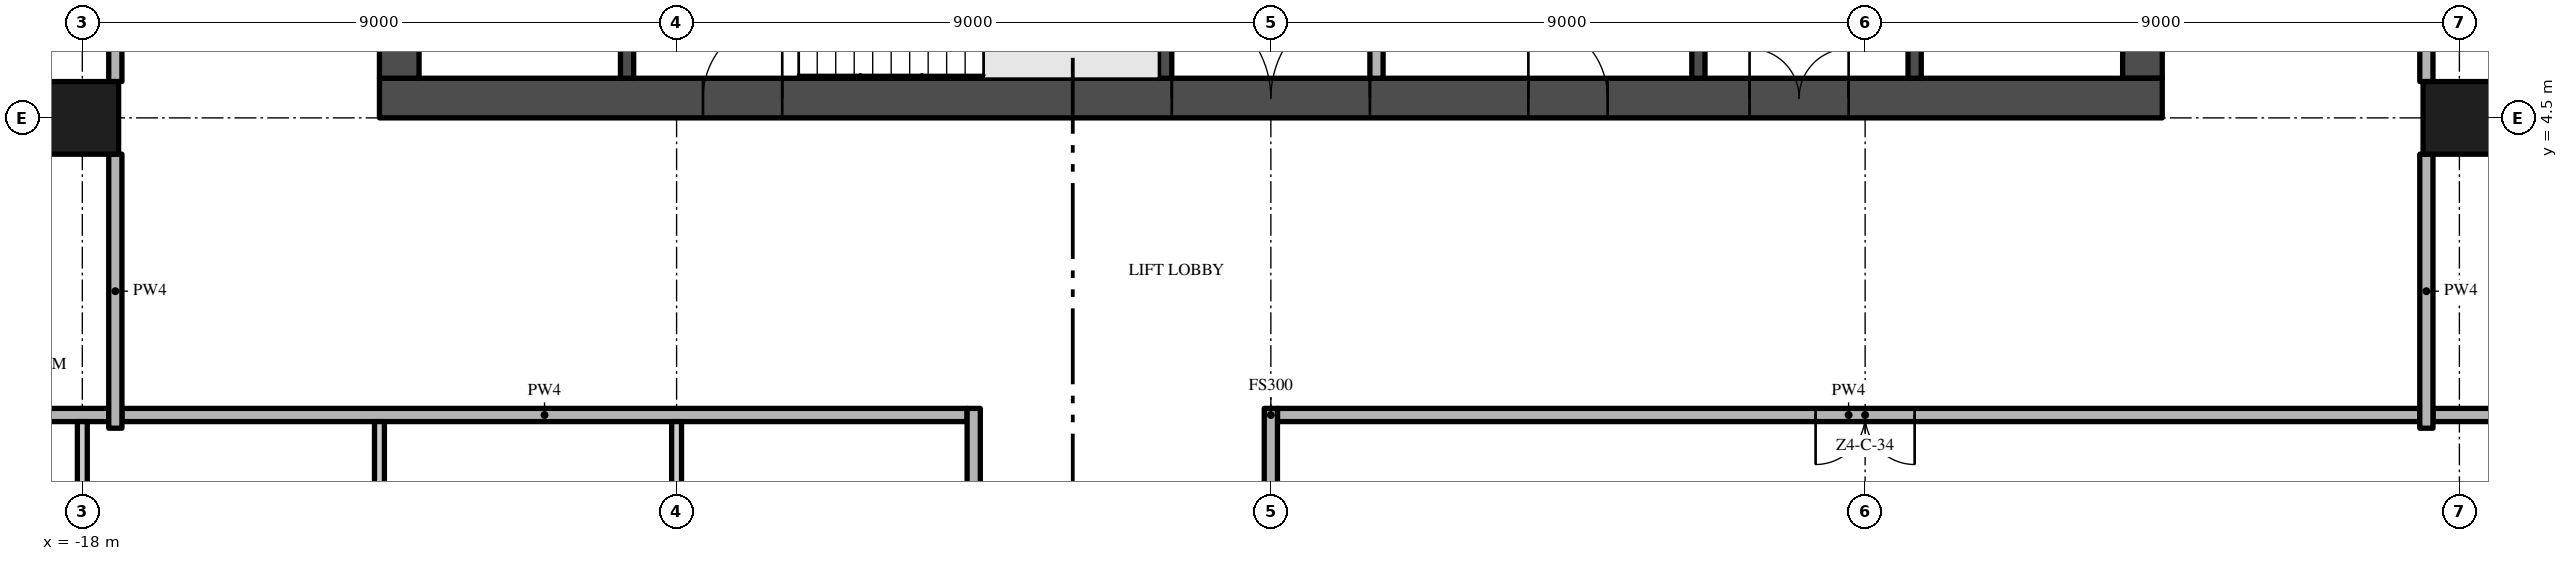
"""IFC4 building model, lengths in metres.
Left out: names, types, materials, properties, quantities, classifications, styles, units other than length and angle.
Written with IfcOpenShell. Run it as: python <this file> out.ifc"""

import sys

from ifc_helpers import new_model, si_unit, direction, frame, frame_2d, origin, origin_2d, place, context, subcontext, project, spatial, rectangle, extrude, element, fill, save


model = new_model("IFC4")
c1 = context("Model", 3, precision=1e-05, world=origin(), true_north=direction((0.0, 1.0)))
c2 = subcontext(c1, "Body", "Model", "MODEL_VIEW")
j1 = project(units=[si_unit("LENGTHUNIT", "METRE"), si_unit("PLANEANGLEUNIT", "RADIAN")], contexts=[c1])
p1 = place(None, origin())
s1 = spatial("IfcSite", under=j1, at=p1, CompositionType="ELEMENT")
p2 = place(p1, origin())
s2 = spatial("IfcBuilding", under=s1, at=p2, CompositionType="ELEMENT")
p3 = place(p2, frame((0.0, 0.0, 214.8)))
s3 = spatial("IfcBuildingStorey", under=s2, at=p3, CompositionType="ELEMENT", Elevation=214.8)
p4 = place(p3, frame((-13.5, 4.8, -0.3), z_axis=(0.0, 0.0, 1.0), x_axis=(1.0, 0.0, 0.0)))
e1 = element("IfcWall", 1, at=p4, inside=s3, PredefinedType="SHEAR", context=c2, shape_type="SweptSolid", body=[
    extrude(rectangle(XDim=27.0, YDim=0.6, at=frame_2d((13.5, 0.0))), origin(), (0.0, 0.0, 1.0), 3.8),
])
p5 = place(p4, frame((12.0, 0.0, 0.3)))
e2 = element("IfcOpeningElement", 2, at=p5, cuts=e1, PredefinedType="OPENING", context=c2, shape_type="SweptSolid", body=[
    extrude(rectangle(XDim=3.0, YDim=2.4, at=frame_2d((1.5, 1.2))), frame((0.0, 0.31, 0.0), z_axis=(0.0, -1.0, 0.0), x_axis=(1.0, 0.0, 0.0)), (0.0, 0.0, 1.0), 0.62),
])
p6 = place(p4, frame((4.9, 0.0, 0.3)))
e3 = element("IfcOpeningElement", 3, at=p6, cuts=e1, PredefinedType="OPENING", context=c2, shape_type="SweptSolid", body=[
    extrude(rectangle(XDim=1.2, YDim=2.2, at=frame_2d((0.6, 1.1))), frame((0.0, 0.31, 0.0), z_axis=(0.0, -1.0, 0.0), x_axis=(1.0, 0.0, 0.0)), (0.0, 0.0, 1.0), 0.62),
])
p7 = place(p4, frame((20.75, 0.0, 0.3)))
e4 = element("IfcOpeningElement", 4, at=p7, cuts=e1, PredefinedType="OPENING", context=c2, shape_type="SweptSolid", body=[
    extrude(rectangle(XDim=1.5, YDim=2.2, at=frame_2d((0.75, 1.1))), frame((0.0, 0.31, 0.0), z_axis=(0.0, -1.0, 0.0), x_axis=(1.0, 0.0, 0.0)), (0.0, 0.0, 1.0), 0.62),
])
p8 = place(p4, frame((17.4, 0.0, 0.3)))
e5 = element("IfcOpeningElement", 5, at=p8, cuts=e1, PredefinedType="OPENING", context=c2, shape_type="SweptSolid", body=[
    extrude(rectangle(XDim=1.2, YDim=2.2, at=frame_2d((0.6, 1.1))), frame((0.0, 0.31, 0.0), z_axis=(0.0, -1.0, 0.0), x_axis=(1.0, 0.0, 0.0)), (0.0, 0.0, 1.0), 0.62),
])
p9 = place(p3, frame((13.2, 5.1, -0.3), z_axis=(0.0, 0.0, 1.0), x_axis=(0.0, 1.0, 0.0)))
e6 = element("IfcWall", 6, at=p9, inside=s3, PredefinedType="SHEAR", context=c2, shape_type="SweptSolid", body=[
    extrude(rectangle(XDim=16.8, YDim=0.6, at=frame_2d((8.4, 0.0))), origin(), (0.0, 0.0, 1.0), 3.8),
])
p10 = place(p9, frame((6.3, 0.0, 0.3)))
e7 = element("IfcOpeningElement", 7, at=p10, cuts=e6, PredefinedType="OPENING", context=c2, shape_type="SweptSolid", body=[
    extrude(rectangle(XDim=1.2, YDim=2.2, at=frame_2d((0.6, 1.1))), frame((0.0, 0.31, 0.0), z_axis=(0.0, -1.0, 0.0), x_axis=(1.0, 0.0, 0.0)), (0.0, 0.0, 1.0), 0.62),
])
p11 = place(p3, frame((-13.2, 21.9, -0.3), z_axis=(0.0, 0.0, 1.0), x_axis=(0.0, -1.0, 0.0)))
e8 = element("IfcWall", 8, at=p11, inside=s3, PredefinedType="SHEAR", context=c2, shape_type="SweptSolid", body=[
    extrude(rectangle(XDim=16.8, YDim=0.6, at=frame_2d((8.4, 0.0))), origin(), (0.0, 0.0, 1.0), 3.8),
])
p12 = place(p11, frame((9.3, 0.0, 0.3)))
e9 = element("IfcOpeningElement", 9, at=p12, cuts=e8, PredefinedType="OPENING", context=c2, shape_type="SweptSolid", body=[
    extrude(rectangle(XDim=1.2, YDim=2.2, at=frame_2d((0.6, 1.1))), frame((0.0, 0.31, 0.0), z_axis=(0.0, -1.0, 0.0), x_axis=(1.0, 0.0, 0.0)), (0.0, 0.0, 1.0), 0.62),
])
for number, where, z_axis, x_axis in (
    (10, (-18.0, 4.5, 0.0), (0.0, 0.0, 1.0), (1.0, 0.0, 0.0)),
    (11, (18.0, 4.5, 0.0), (0.0, 0.0, 1.0), (1.0, 0.0, 0.0)),
):
    element("IfcColumn", number, at=place(p3, frame(where, z_axis=z_axis, x_axis=x_axis)), inside=s3, PredefinedType="COLUMN", context=c2, shape_type="SweptSolid", body=[
        extrude(rectangle(XDim=1.1, YDim=1.1, at=origin_2d()), origin(), (0.0, 0.0, 1.0), 3.5),
    ])
for number, where, z_axis, x_axis in (
    (12, (-9.75, 5.1, 0.0), (0.0, 0.0, 1.0), (0.0, 1.0, 0.0)),
    (13, (-1.6, 5.1, 0.0), (0.0, 0.0, 1.0), (0.0, 1.0, 0.0)),
):
    element("IfcWall", number, at=place(p3, frame(where, z_axis=z_axis, x_axis=x_axis)), inside=s3, PredefinedType="SHEAR", context=c2, shape_type="SweptSolid", body=[
        extrude(rectangle(XDim=2.85, YDim=0.2, at=frame_2d((1.425, 0.0))), origin(), (0.0, 0.0, 1.0), 3.5),
    ])
p13 = place(p3, frame((1.6, 7.5, 0.0), z_axis=(0.0, 0.0, 1.0), x_axis=(0.0, -1.0, 0.0)))
e14 = element("IfcWall", 14, at=p13, inside=s3, PredefinedType="PARTITIONING", context=c2, shape_type="SweptSolid", body=[
    extrude(rectangle(XDim=2.4, YDim=0.2, at=frame_2d((1.2, 0.0))), origin(), (0.0, 0.0, 1.0), 3.5),
])
p14 = place(p13, frame((0.35, 0.0, 0.0)))
e15 = element("IfcOpeningElement", 15, at=p14, cuts=e14, PredefinedType="OPENING", context=c2, shape_type="SweptSolid", body=[
    extrude(rectangle(XDim=0.9, YDim=2.1, at=frame_2d((0.45, 1.05))), frame((0.0, 0.11, 0.0), z_axis=(0.0, -1.0, 0.0), x_axis=(1.0, 0.0, 0.0)), (0.0, 0.0, 1.0), 0.22),
])
p15 = place(p3, frame((6.475, 5.1, 0.0), z_axis=(0.0, 0.0, 1.0), x_axis=(0.0, 1.0, 0.0)))
e16 = element("IfcWall", 16, at=p15, inside=s3, PredefinedType="SHEAR", context=c2, shape_type="SweptSolid", body=[
    extrude(rectangle(XDim=2.4, YDim=0.2, at=frame_2d((1.2, 0.0))), origin(), (0.0, 0.0, 1.0), 3.5),
])
p16 = place(p3, frame((9.75, 5.1, 0.0), z_axis=(0.0, 0.0, 1.0), x_axis=(0.0, 1.0, 0.0)))
e17 = element("IfcWall", 17, at=p16, inside=s3, PredefinedType="SHEAR", context=c2, shape_type="SweptSolid", body=[
    extrude(rectangle(XDim=2.5, YDim=0.2, at=frame_2d((1.25, 0.0))), origin(), (0.0, 0.0, 1.0), 3.5),
])
p17 = place(p16, frame((0.85, 0.0, 0.0)))
e18 = element("IfcOpeningElement", 18, at=p17, cuts=e17, PredefinedType="OPENING", context=c2, shape_type="SweptSolid", body=[
    extrude(rectangle(XDim=1.1, YDim=2.1, at=frame_2d((0.55, 1.05))), frame((0.0, 0.11, 0.0), z_axis=(0.0, -1.0, 0.0), x_axis=(1.0, 0.0, 0.0)), (0.0, 0.0, 1.0), 0.22),
])
p18 = place(p3, frame((-17.4, 0.0, 0.0), z_axis=(0.0, 0.0, 1.0), x_axis=(1.0, 0.0, 0.0)))
e19 = element("IfcWall", 19, at=p18, inside=s3, PredefinedType="PARTITIONING", context=c2, shape_type="SweptSolid", body=[
    extrude(rectangle(XDim=12.8, YDim=0.2, at=frame_2d((6.4, 0.0))), origin(), (0.0, 0.0, 1.0), 3.5),
])
p19 = place(p3, frame((17.4, 0.0, 0.0), z_axis=(0.0, 0.0, 1.0), x_axis=(-1.0, 0.0, 0.0)))
e20 = element("IfcWall", 20, at=p19, inside=s3, PredefinedType="PARTITIONING", context=c2, shape_type="SweptSolid", body=[
    extrude(rectangle(XDim=17.3, YDim=0.2, at=frame_2d((8.65, 0.0))), origin(), (0.0, 0.0, 1.0), 3.5),
])
p20 = place(p19, frame((7.65, 0.0, 0.0)))
e21 = element("IfcOpeningElement", 21, at=p20, cuts=e20, PredefinedType="OPENING", context=c2, shape_type="SweptSolid", body=[
    extrude(rectangle(XDim=1.5, YDim=2.4, at=frame_2d((0.75, 1.2))), frame((0.0, 0.11, 0.0), z_axis=(0.0, -1.0, 0.0), x_axis=(1.0, 0.0, 0.0)), (0.0, 0.0, 1.0), 0.22),
])
for number, where, z_axis, x_axis in (
    (22, (-26.7, 0.0, 0.0), (0.0, 0.0, 1.0), (1.0, 0.0, 0.0)),
    (23, (17.6, 0.0, 0.0), (0.0, 0.0, 1.0), (1.0, 0.0, 0.0)),
):
    element("IfcWall", number, at=place(p3, frame(where, z_axis=z_axis, x_axis=x_axis)), inside=s3, PredefinedType="PARTITIONING", context=c2, shape_type="SweptSolid", body=[
        extrude(rectangle(XDim=9.1, YDim=0.2, at=frame_2d((4.55, 0.0))), origin(), (0.0, 0.0, 1.0), 3.5),
    ])
p21 = place(p3, frame((-18.0, -3.95, 0.0), z_axis=(0.0, 0.0, 1.0), x_axis=(0.0, 1.0, 0.0)))
e24 = element("IfcWall", 24, at=p21, inside=s3, PredefinedType="PARTITIONING", context=c2, shape_type="SweptSolid", body=[
    extrude(rectangle(XDim=3.85, YDim=0.15, at=frame_2d((1.925, 0.0))), origin(), (0.0, 0.0, 1.0), 3.5),
])
p22 = place(p21, frame((0.15, 0.0, 0.0)))
e25 = element("IfcOpeningElement", 25, at=p22, cuts=e24, PredefinedType="OPENING", context=c2, shape_type="SweptSolid", body=[
    extrude(rectangle(XDim=1.0, YDim=2.4, at=frame_2d((0.5, 1.2))), frame((0.0, 0.085, 0.0), z_axis=(0.0, -1.0, 0.0), x_axis=(1.0, 0.0, 0.0)), (0.0, 0.0, 1.0), 0.17),
])
p23 = place(p3, frame((-17.5, -0.2, 0.0), z_axis=(0.0, 0.0, 1.0), x_axis=(0.0, 1.0, 0.0)))
e26 = element("IfcWall", 26, at=p23, inside=s3, PredefinedType="PARTITIONING", context=c2, shape_type="SweptSolid", body=[
    extrude(rectangle(XDim=4.15, YDim=0.2, at=frame_2d((2.075, 0.0))), origin(), (0.0, 0.0, 1.0), 3.5),
])
p24 = place(p3, frame((-17.5, 5.05, 0.0), z_axis=(0.0, 0.0, 1.0), x_axis=(0.0, 1.0, 0.0)))
e27 = element("IfcWall", 27, at=p24, inside=s3, PredefinedType="PARTITIONING", context=c2, shape_type="SweptSolid", body=[
    extrude(rectangle(XDim=7.9, YDim=0.2, at=frame_2d((3.95, 0.0))), origin(), (0.0, 0.0, 1.0), 3.5),
])
p25 = place(p3, frame((-13.5, -8.325, 0.0), z_axis=(0.0, 0.0, 1.0), x_axis=(0.0, 1.0, 0.0)))
e28 = element("IfcWall", 28, at=p25, inside=s3, PredefinedType="PARTITIONING", context=c2, shape_type="SweptSolid", body=[
    extrude(rectangle(XDim=8.225, YDim=0.15, at=frame_2d((4.112, 0.0))), origin(), (0.0, 0.0, 1.0), 3.5),
])
p26 = place(p3, frame((-9.0, -3.95, 0.0), z_axis=(0.0, 0.0, 1.0), x_axis=(0.0, 1.0, 0.0)))
e29 = element("IfcWall", 29, at=p26, inside=s3, PredefinedType="PARTITIONING", context=c2, shape_type="SweptSolid", body=[
    extrude(rectangle(XDim=3.85, YDim=0.15, at=frame_2d((1.925, 0.0))), origin(), (0.0, 0.0, 1.0), 3.5),
])
p27 = place(p26, frame((0.45, 0.0, 0.0)))
e30 = element("IfcOpeningElement", 30, at=p27, cuts=e29, PredefinedType="OPENING", context=c2, shape_type="SweptSolid", body=[
    extrude(rectangle(XDim=1.0, YDim=2.4, at=frame_2d((0.5, 1.2))), frame((0.0, 0.085, 0.0), z_axis=(0.0, -1.0, 0.0), x_axis=(1.0, 0.0, 0.0)), (0.0, 0.0, 1.0), 0.17),
])
p28 = place(p3, frame((-4.5, -22.2, 0.0), z_axis=(0.0, 0.0, 1.0), x_axis=(0.0, 1.0, 0.0)))
e31 = element("IfcWall", 31, at=p28, inside=s3, PredefinedType="PARTITIONING", context=c2, shape_type="SweptSolid", body=[
    extrude(rectangle(XDim=22.3, YDim=0.2, at=frame_2d((11.15, 0.0))), origin(), (0.0, 0.0, 1.0), 3.5),
])
p29 = place(p28, frame((10.2, 0.0, 0.0)))
e32 = element("IfcOpeningElement", 32, at=p29, cuts=e31, PredefinedType="OPENING", context=c2, shape_type="SweptSolid", body=[
    extrude(rectangle(XDim=1.5, YDim=2.4, at=frame_2d((0.75, 1.2))), frame((0.0, 0.11, 0.0), z_axis=(0.0, -1.0, 0.0), x_axis=(1.0, 0.0, 0.0)), (0.0, 0.0, 1.0), 0.22),
])
p30 = place(p3, frame((0.0, -3.95, 0.0), z_axis=(0.0, 0.0, 1.0), x_axis=(0.0, 1.0, 0.0)))
e33 = element("IfcWall", 33, at=p30, inside=s3, PredefinedType="PARTITIONING", context=c2, shape_type="SweptSolid", body=[
    extrude(rectangle(XDim=4.05, YDim=0.2, at=frame_2d((2.025, 0.0))), origin(), (0.0, 0.0, 1.0), 3.5),
])
p31 = place(p3, frame((17.5, -0.2, 0.0), z_axis=(0.0, 0.0, 1.0), x_axis=(0.0, 1.0, 0.0)))
e34 = element("IfcWall", 34, at=p31, inside=s3, PredefinedType="PARTITIONING", context=c2, shape_type="SweptSolid", body=[
    extrude(rectangle(XDim=4.15, YDim=0.2, at=frame_2d((2.075, 0.0))), origin(), (0.0, 0.0, 1.0), 3.5),
])
p32 = place(p3, frame((17.5, 5.05, 0.0), z_axis=(0.0, 0.0, 1.0), x_axis=(0.0, 1.0, 0.0)))
e35 = element("IfcWall", 35, at=p32, inside=s3, PredefinedType="PARTITIONING", context=c2, shape_type="SweptSolid", body=[
    extrude(rectangle(XDim=7.9, YDim=0.2, at=frame_2d((3.95, 0.0))), origin(), (0.0, 0.0, 1.0), 3.5),
])
p33 = place(p5, frame((3.0, 0.0, 0.0), z_axis=(0.0, 0.0, 1.0), x_axis=(-1.0, 0.0, 0.0)))
e36 = element("IfcDoor", 36, at=p33, inside=s3, OperationType="DOUBLE_DOOR_SINGLE_SWING", PredefinedType="DOOR", context=c2, shape_type="SweptSolid", body=[
    extrude(rectangle(XDim=3.0, YDim=2.4, at=frame_2d((1.5, 1.2))), frame((0.0, 0.025, 0.0), z_axis=(0.0, -1.0, 0.0), x_axis=(1.0, 0.0, 0.0)), (0.0, 0.0, 1.0), 0.05),
])
fill(e2, e36)
p34 = place(p6, frame((1.2, 0.0, 0.0), z_axis=(0.0, 0.0, 1.0), x_axis=(-1.0, 0.0, 0.0)))
e37 = element("IfcDoor", 37, at=p34, inside=s3, OperationType="SINGLE_SWING_LEFT", PredefinedType="DOOR", context=c2, shape_type="SweptSolid", body=[
    extrude(rectangle(XDim=1.2, YDim=2.2, at=frame_2d((0.6, 1.1))), frame((0.0, 0.025, 0.0), z_axis=(0.0, -1.0, 0.0), x_axis=(1.0, 0.0, 0.0)), (0.0, 0.0, 1.0), 0.05),
])
fill(e3, e37)
p35 = place(p7, frame((1.5, 0.0, 0.0), z_axis=(0.0, 0.0, 1.0), x_axis=(-1.0, 0.0, 0.0)))
e38 = element("IfcDoor", 38, at=p35, inside=s3, OperationType="DOUBLE_DOOR_SINGLE_SWING", PredefinedType="DOOR", context=c2, shape_type="SweptSolid", body=[
    extrude(rectangle(XDim=1.5, YDim=2.2, at=frame_2d((0.75, 1.1))), frame((0.0, 0.025, 0.0), z_axis=(0.0, -1.0, 0.0), x_axis=(1.0, 0.0, 0.0)), (0.0, 0.0, 1.0), 0.05),
])
fill(e4, e38)
p36 = place(p8, frame((1.2, 0.0, 0.0), z_axis=(0.0, 0.0, 1.0), x_axis=(-1.0, 0.0, 0.0)))
e39 = element("IfcDoor", 39, at=p36, inside=s3, OperationType="SINGLE_SWING_RIGHT", PredefinedType="DOOR", context=c2, shape_type="SweptSolid", body=[
    extrude(rectangle(XDim=1.2, YDim=2.2, at=frame_2d((0.6, 1.1))), frame((0.0, 0.025, 0.0), z_axis=(0.0, -1.0, 0.0), x_axis=(1.0, 0.0, 0.0)), (0.0, 0.0, 1.0), 0.05),
])
fill(e5, e39)
p37 = place(p20, origin())
e40 = element("IfcDoor", 40, at=p37, inside=s3, OperationType="DOUBLE_DOOR_SINGLE_SWING", PredefinedType="DOOR", context=c2, shape_type="SweptSolid", body=[
    extrude(rectangle(XDim=1.5, YDim=2.4, at=frame_2d((0.75, 1.2))), frame((0.0, 0.025, 0.0), z_axis=(0.0, -1.0, 0.0), x_axis=(1.0, 0.0, 0.0)), (0.0, 0.0, 1.0), 0.05),
])
fill(e21, e40)
save(model, sys.argv[1])
